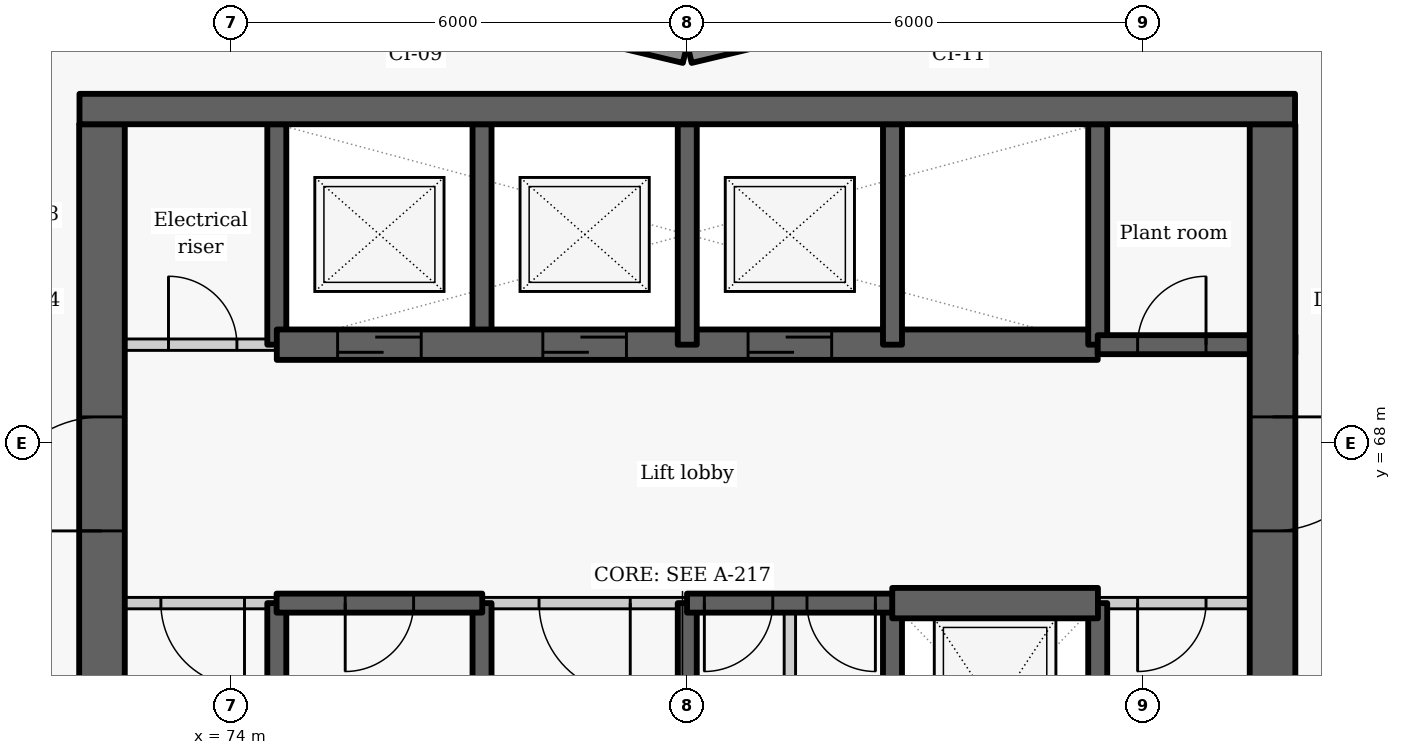
"""IFC4 building model, lengths in metres.
Left out: names, types, materials, properties, quantities, classifications, styles, units other than length and angle.
Written with IfcOpenShell. Run it as: python <this file> out.ifc"""

import sys

from ifc_helpers import new_model, si_unit, direction, frame, frame_2d, origin, place, context, subcontext, project, spatial, rectangle, extrude, element, fill, save


model = new_model("IFC4")
c1 = context("Model", 3, precision=1e-05, world=origin(), true_north=direction((0.0, 1.0)))
c2 = subcontext(c1, "Body", "Model", "MODEL_VIEW")
j1 = project(units=[si_unit("LENGTHUNIT", "METRE"), si_unit("PLANEANGLEUNIT", "RADIAN")], contexts=[c1])
p1 = place(None, origin())
s1 = spatial("IfcSite", under=j1, at=p1, CompositionType="ELEMENT")
p2 = place(p1, origin())
s2 = spatial("IfcBuilding", under=s1, at=p2, CompositionType="ELEMENT")
p3 = place(p2, frame((0.0, 0.0, 81.0)))
s3 = spatial("IfcBuildingStorey", under=s2, at=p3, CompositionType="ELEMENT", Elevation=81.0)
for number, where, z_axis, x_axis in (
    (1, (83.186, 73.881, 0.0), (0.0, 0.0, 1.0), (-0.973, -0.232, 0.0)),
    (2, (79.971, 73.128, 0.0), (0.0, 0.0, 1.0), (-0.973, 0.232, 0.0)),
):
    element("IfcWall", number, at=place(p3, frame(where, z_axis=z_axis, x_axis=x_axis)), inside=s3, PredefinedType="SOLIDWALL", context=c2, shape_type="SweptSolid", body=[
        extrude(rectangle(XDim=3.246, YDim=0.25, at=frame_2d((1.623, 0.0))), origin(), (0.0, 0.0, 1.0), 2.425),
    ])
p4 = place(p3, frame((74.6, 63.1, -0.275), z_axis=(0.0, 0.0, 1.0), x_axis=(0.0, 1.0, 0.0)))
e3 = element("IfcWall", 3, at=p4, inside=s3, PredefinedType="SHEAR", context=c2, shape_type="SweptSolid", body=[
    extrude(rectangle(XDim=2.8, YDim=0.25, at=frame_2d((1.4, 0.0))), origin(), (0.0, 0.0, 1.0), 3.3),
])
p5 = place(p3, frame((74.6, 69.3, -0.275), z_axis=(0.0, 0.0, 1.0), x_axis=(0.0, 1.0, 0.0)))
e4 = element("IfcWall", 4, at=p5, inside=s3, PredefinedType="SHEAR", context=c2, shape_type="SweptSolid", body=[
    extrude(rectangle(XDim=2.9, YDim=0.25, at=frame_2d((1.45, 0.0))), origin(), (0.0, 0.0, 1.0), 3.3),
])
p6 = place(p3, frame((72.0, 69.3, 0.0), z_axis=(0.0, 0.0, 1.0), x_axis=(1.0, 0.0, 0.0)))
e5 = element("IfcWall", 5, at=p6, inside=s3, PredefinedType="PARTITIONING", context=c2, shape_type="SweptSolid", body=[
    extrude(rectangle(XDim=2.6, YDim=0.15, at=frame_2d((1.3, 0.0))), origin(), (0.0, 0.0, 1.0), 3.025),
])
p7 = place(p6, frame((1.175, 0.0, 0.0)))
e6 = element("IfcOpeningElement", 6, at=p7, cuts=e5, PredefinedType="OPENING", context=c2, shape_type="SweptSolid", body=[
    extrude(rectangle(XDim=0.9, YDim=2.1, at=frame_2d((0.45, 1.05))), frame((0.0, 0.085, 0.0), z_axis=(0.0, -1.0, 0.0), x_axis=(1.0, 0.0, 0.0)), (0.0, 0.0, 1.0), 0.17),
])
p8 = place(p3, frame((72.3, 63.1, -0.275), z_axis=(0.0, 0.0, 1.0), x_axis=(0.0, 1.0, 0.0)))
e7 = element("IfcWall", 7, at=p8, inside=s3, PredefinedType="SHEAR", context=c2, shape_type="SweptSolid", body=[
    extrude(rectangle(XDim=9.1, YDim=0.6, at=frame_2d((4.55, 0.0))), origin(), (0.0, 0.0, 1.0), 3.3),
])
p9 = place(p8, frame((3.75, 0.0, 0.275)))
e8 = element("IfcOpeningElement", 8, at=p9, cuts=e7, PredefinedType="OPENING", context=c2, shape_type="SweptSolid", body=[
    extrude(rectangle(XDim=1.5, YDim=2.1, at=frame_2d((0.75, 1.05))), frame((0.0, 0.31, 0.0), z_axis=(0.0, -1.0, 0.0), x_axis=(1.0, 0.0, 0.0)), (0.0, 0.0, 1.0), 0.62),
])
p10 = place(p3, frame((77.3, 63.1, -0.275), z_axis=(0.0, 0.0, 1.0), x_axis=(0.0, 1.0, 0.0)))
e9 = element("IfcWall", 9, at=p10, inside=s3, PredefinedType="SHEAR", context=c2, shape_type="SweptSolid", body=[
    extrude(rectangle(XDim=2.8, YDim=0.25, at=frame_2d((1.4, 0.0))), origin(), (0.0, 0.0, 1.0), 3.3),
])
p11 = place(p3, frame((77.3, 69.3, -0.275), z_axis=(0.0, 0.0, 1.0), x_axis=(0.0, 1.0, 0.0)))
e10 = element("IfcWall", 10, at=p11, inside=s3, PredefinedType="SHEAR", context=c2, shape_type="SweptSolid", body=[
    extrude(rectangle(XDim=2.9, YDim=0.25, at=frame_2d((1.45, 0.0))), origin(), (0.0, 0.0, 1.0), 3.3),
])
p12 = place(p3, frame((74.6, 69.3, -0.275), z_axis=(0.0, 0.0, 1.0), x_axis=(1.0, 0.0, 0.0)))
e11 = element("IfcWall", 11, at=p12, inside=s3, PredefinedType="SHEAR", context=c2, shape_type="SweptSolid", body=[
    extrude(rectangle(XDim=10.8, YDim=0.4, at=frame_2d((5.4, 0.0))), origin(), (0.0, 0.0, 1.0), 3.3),
])
p13 = place(p12, frame((0.8, 0.0, 0.275)))
e12 = element("IfcOpeningElement", 12, at=p13, cuts=e11, PredefinedType="OPENING", context=c2, shape_type="SweptSolid", body=[
    extrude(rectangle(XDim=1.1, YDim=2.1, at=frame_2d((0.55, 1.05))), frame((0.0, 0.21, 0.0), z_axis=(0.0, -1.0, 0.0), x_axis=(1.0, 0.0, 0.0)), (0.0, 0.0, 1.0), 0.42),
])
p14 = place(p12, frame((3.5, 0.0, 0.275)))
e13 = element("IfcOpeningElement", 13, at=p14, cuts=e11, PredefinedType="OPENING", context=c2, shape_type="SweptSolid", body=[
    extrude(rectangle(XDim=1.1, YDim=2.1, at=frame_2d((0.55, 1.05))), frame((0.0, 0.21, 0.0), z_axis=(0.0, -1.0, 0.0), x_axis=(1.0, 0.0, 0.0)), (0.0, 0.0, 1.0), 0.42),
])
p15 = place(p12, frame((6.2, 0.0, 0.275)))
e14 = element("IfcOpeningElement", 14, at=p15, cuts=e11, PredefinedType="OPENING", context=c2, shape_type="SweptSolid", body=[
    extrude(rectangle(XDim=1.1, YDim=2.1, at=frame_2d((0.55, 1.05))), frame((0.0, 0.21, 0.0), z_axis=(0.0, -1.0, 0.0), x_axis=(1.0, 0.0, 0.0)), (0.0, 0.0, 1.0), 0.42),
])
p16 = place(p3, frame((80.0, 63.1, -0.275), z_axis=(0.0, 0.0, 1.0), x_axis=(0.0, 1.0, 0.0)))
e15 = element("IfcWall", 15, at=p16, inside=s3, PredefinedType="SHEAR", context=c2, shape_type="SweptSolid", body=[
    extrude(rectangle(XDim=2.8, YDim=0.25, at=frame_2d((1.4, 0.0))), origin(), (0.0, 0.0, 1.0), 3.3),
])
p17 = place(p3, frame((80.0, 69.3, -0.275), z_axis=(0.0, 0.0, 1.0), x_axis=(0.0, 1.0, 0.0)))
e16 = element("IfcWall", 16, at=p17, inside=s3, PredefinedType="SHEAR", context=c2, shape_type="SweptSolid", body=[
    extrude(rectangle(XDim=2.9, YDim=0.25, at=frame_2d((1.45, 0.0))), origin(), (0.0, 0.0, 1.0), 3.3),
])
p18 = place(p3, frame((82.7, 63.1, -0.275), z_axis=(0.0, 0.0, 1.0), x_axis=(0.0, 1.0, 0.0)))
e17 = element("IfcWall", 17, at=p18, inside=s3, PredefinedType="SHEAR", context=c2, shape_type="SweptSolid", body=[
    extrude(rectangle(XDim=2.8, YDim=0.25, at=frame_2d((1.4, 0.0))), origin(), (0.0, 0.0, 1.0), 3.3),
])
p19 = place(p3, frame((82.7, 69.3, -0.275), z_axis=(0.0, 0.0, 1.0), x_axis=(0.0, 1.0, 0.0)))
e18 = element("IfcWall", 18, at=p19, inside=s3, PredefinedType="SHEAR", context=c2, shape_type="SweptSolid", body=[
    extrude(rectangle(XDim=2.9, YDim=0.25, at=frame_2d((1.45, 0.0))), origin(), (0.0, 0.0, 1.0), 3.3),
])
p20 = place(p3, frame((85.4, 63.1, -0.275), z_axis=(0.0, 0.0, 1.0), x_axis=(0.0, 1.0, 0.0)))
e19 = element("IfcWall", 19, at=p20, inside=s3, PredefinedType="SHEAR", context=c2, shape_type="SweptSolid", body=[
    extrude(rectangle(XDim=2.8, YDim=0.25, at=frame_2d((1.4, 0.0))), origin(), (0.0, 0.0, 1.0), 3.3),
])
p21 = place(p3, frame((85.4, 69.3, -0.275), z_axis=(0.0, 0.0, 1.0), x_axis=(0.0, 1.0, 0.0)))
e20 = element("IfcWall", 20, at=p21, inside=s3, PredefinedType="SHEAR", context=c2, shape_type="SweptSolid", body=[
    extrude(rectangle(XDim=2.9, YDim=0.25, at=frame_2d((1.45, 0.0))), origin(), (0.0, 0.0, 1.0), 3.3),
])
p22 = place(p3, frame((85.4, 69.3, -0.275), z_axis=(0.0, 0.0, 1.0), x_axis=(1.0, 0.0, 0.0)))
e21 = element("IfcWall", 21, at=p22, inside=s3, PredefinedType="SHEAR", context=c2, shape_type="SweptSolid", body=[
    extrude(rectangle(XDim=2.6, YDim=0.25, at=frame_2d((1.3, 0.0))), origin(), (0.0, 0.0, 1.0), 3.3),
])
p23 = place(p22, frame((0.525, 0.0, 0.275)))
e22 = element("IfcOpeningElement", 22, at=p23, cuts=e21, PredefinedType="OPENING", context=c2, shape_type="SweptSolid", body=[
    extrude(rectangle(XDim=0.9, YDim=2.1, at=frame_2d((0.45, 1.05))), frame((0.0, 0.135, 0.0), z_axis=(0.0, -1.0, 0.0), x_axis=(1.0, 0.0, 0.0)), (0.0, 0.0, 1.0), 0.27),
])
p24 = place(p3, frame((87.7, 72.2, -0.275), z_axis=(0.0, 0.0, 1.0), x_axis=(0.0, -1.0, 0.0)))
e23 = element("IfcWall", 23, at=p24, inside=s3, PredefinedType="SHEAR", context=c2, shape_type="SweptSolid", body=[
    extrude(rectangle(XDim=15.6, YDim=0.6, at=frame_2d((7.8, 0.0))), origin(), (0.0, 0.0, 1.0), 3.3),
])
p25 = place(p24, frame((3.85, 0.0, 0.275)))
e24 = element("IfcOpeningElement", 24, at=p25, cuts=e23, PredefinedType="OPENING", context=c2, shape_type="SweptSolid", body=[
    extrude(rectangle(XDim=1.5, YDim=2.1, at=frame_2d((0.75, 1.05))), frame((0.0, 0.31, 0.0), z_axis=(0.0, -1.0, 0.0), x_axis=(1.0, 0.0, 0.0)), (0.0, 0.0, 1.0), 0.62),
])
p26 = place(p24, frame((11.8, 0.0, 0.275)))
e25 = element("IfcOpeningElement", 25, at=p26, cuts=e23, PredefinedType="OPENING", context=c2, shape_type="SweptSolid", body=[
    extrude(rectangle(XDim=1.1, YDim=2.1, at=frame_2d((0.55, 1.05))), frame((0.0, 0.31, 0.0), z_axis=(0.0, -1.0, 0.0), x_axis=(1.0, 0.0, 0.0)), (0.0, 0.0, 1.0), 0.62),
])
p27 = place(p3, frame((74.603, 65.9, 0.0), z_axis=(0.0, 0.0, 1.0), x_axis=(-1.0, 0.0, 0.0)))
e26 = element("IfcWall", 26, at=p27, inside=s3, PredefinedType="PARTITIONING", context=c2, shape_type="SweptSolid", body=[
    extrude(rectangle(XDim=2.603, YDim=0.15, at=frame_2d((1.302, 0.0))), origin(), (0.0, 0.0, 1.0), 3.025),
])
p28 = place(p27, frame((0.428, 0.0, 0.0)))
e27 = element("IfcOpeningElement", 27, at=p28, cuts=e26, PredefinedType="OPENING", context=c2, shape_type="SweptSolid", body=[
    extrude(rectangle(XDim=1.1, YDim=2.1, at=frame_2d((0.55, 1.05))), frame((0.0, 0.085, 0.0), z_axis=(0.0, -1.0, 0.0), x_axis=(1.0, 0.0, 0.0)), (0.0, 0.0, 1.0), 0.17),
])
p29 = place(p3, frame((80.003, 65.9, 0.0), z_axis=(0.0, 0.0, 1.0), x_axis=(-1.0, 0.0, 0.0)))
e28 = element("IfcWall", 28, at=p29, inside=s3, PredefinedType="PARTITIONING", context=c2, shape_type="SweptSolid", body=[
    extrude(rectangle(XDim=2.706, YDim=0.15, at=frame_2d((1.353, 0.0))), origin(), (0.0, 0.0, 1.0), 3.025),
])
p30 = place(p29, frame((0.753, 0.0, 0.0)))
e29 = element("IfcOpeningElement", 29, at=p30, cuts=e28, PredefinedType="OPENING", context=c2, shape_type="SweptSolid", body=[
    extrude(rectangle(XDim=1.2, YDim=2.1, at=frame_2d((0.6, 1.05))), frame((0.0, 0.085, 0.0), z_axis=(0.0, -1.0, 0.0), x_axis=(1.0, 0.0, 0.0)), (0.0, 0.0, 1.0), 0.17),
])
p31 = place(p3, frame((88.0, 65.9, 0.0), z_axis=(0.0, 0.0, 1.0), x_axis=(-1.0, 0.0, 0.0)))
e30 = element("IfcWall", 30, at=p31, inside=s3, PredefinedType="PARTITIONING", context=c2, shape_type="SweptSolid", body=[
    extrude(rectangle(XDim=2.603, YDim=0.15, at=frame_2d((1.302, 0.0))), origin(), (0.0, 0.0, 1.0), 3.025),
])
p32 = place(p31, frame((1.175, 0.0, 0.0)))
e31 = element("IfcOpeningElement", 31, at=p32, cuts=e30, PredefinedType="OPENING", context=c2, shape_type="SweptSolid", body=[
    extrude(rectangle(XDim=0.9, YDim=2.1, at=frame_2d((0.45, 1.05))), frame((0.0, 0.085, 0.0), z_axis=(0.0, -1.0, 0.0), x_axis=(1.0, 0.0, 0.0)), (0.0, 0.0, 1.0), 0.17),
])
p33 = place(p3, frame((77.303, 65.9, -0.275), z_axis=(0.0, 0.0, 1.0), x_axis=(-1.0, 0.0, 0.0)))
e32 = element("IfcWall", 32, at=p33, inside=s3, PredefinedType="SHEAR", context=c2, shape_type="SweptSolid", body=[
    extrude(rectangle(XDim=2.706, YDim=0.25, at=frame_2d((1.353, 0.0))), origin(), (0.0, 0.0, 1.0), 3.3),
])
p34 = place(p33, frame((0.903, 0.0, 0.275)))
e33 = element("IfcOpeningElement", 33, at=p34, cuts=e32, PredefinedType="OPENING", context=c2, shape_type="SweptSolid", body=[
    extrude(rectangle(XDim=0.9, YDim=2.1, at=frame_2d((0.45, 1.05))), frame((0.0, 0.135, 0.0), z_axis=(0.0, -1.0, 0.0), x_axis=(1.0, 0.0, 0.0)), (0.0, 0.0, 1.0), 0.27),
])
p35 = place(p3, frame((82.703, 65.9, -0.275), z_axis=(0.0, 0.0, 1.0), x_axis=(-1.0, 0.0, 0.0)))
e34 = element("IfcWall", 34, at=p35, inside=s3, PredefinedType="SHEAR", context=c2, shape_type="SweptSolid", body=[
    extrude(rectangle(XDim=2.706, YDim=0.25, at=frame_2d((1.353, 0.0))), origin(), (0.0, 0.0, 1.0), 3.3),
])
p36 = place(p35, frame((1.578, 0.0, 0.275)))
e35 = element("IfcOpeningElement", 35, at=p36, cuts=e34, PredefinedType="OPENING", context=c2, shape_type="SweptSolid", body=[
    extrude(rectangle(XDim=0.9, YDim=2.1, at=frame_2d((0.45, 1.05))), frame((0.0, 0.135, 0.0), z_axis=(0.0, -1.0, 0.0), x_axis=(1.0, 0.0, 0.0)), (0.0, 0.0, 1.0), 0.27),
])
p37 = place(p35, frame((0.228, 0.0, 0.275)))
e36 = element("IfcOpeningElement", 36, at=p37, cuts=e34, PredefinedType="OPENING", context=c2, shape_type="SweptSolid", body=[
    extrude(rectangle(XDim=0.9, YDim=2.1, at=frame_2d((0.45, 1.05))), frame((0.0, 0.135, 0.0), z_axis=(0.0, -1.0, 0.0), x_axis=(1.0, 0.0, 0.0)), (0.0, 0.0, 1.0), 0.27),
])
p38 = place(p3, frame((82.697, 65.9, -0.275), z_axis=(0.0, 0.0, 1.0), x_axis=(1.0, 0.0, 0.0)))
e37 = element("IfcWall", 37, at=p38, inside=s3, PredefinedType="SHEAR", context=c2, shape_type="SweptSolid", body=[
    extrude(rectangle(XDim=2.706, YDim=0.4, at=frame_2d((1.353, 0.0))), origin(), (0.0, 0.0, 1.0), 3.3),
])
p39 = place(p3, frame((81.35, 63.1, 0.0), z_axis=(0.0, 0.0, 1.0), x_axis=(0.0, 1.0, 0.0)))
e38 = element("IfcWall", 38, at=p39, inside=s3, PredefinedType="PARTITIONING", context=c2, shape_type="SweptSolid", body=[
    extrude(rectangle(XDim=2.8, YDim=0.15, at=frame_2d((1.4, 0.0))), origin(), (0.0, 0.0, 1.0), 3.025),
])
p40 = place(p3, frame((72.004, 72.4, -0.275), z_axis=(0.0, 0.0, 1.0), x_axis=(1.0, 0.0, 0.0)))
e39 = element("IfcWall", 39, at=p40, inside=s3, PredefinedType="SHEAR", context=c2, shape_type="SweptSolid", body=[
    extrude(rectangle(XDim=15.992, YDim=0.4, at=frame_2d((7.996, 0.0))), origin(), (0.0, 0.0, 1.0), 3.3),
])
p41 = place(p7, origin())
e40 = element("IfcDoor", 40, at=p41, inside=s3, OperationType="SINGLE_SWING_LEFT", PredefinedType="DOOR", context=c2, shape_type="SweptSolid", body=[
    extrude(rectangle(XDim=0.9, YDim=2.1, at=frame_2d((0.45, 1.05))), frame((0.0, 0.025, 0.0), z_axis=(0.0, -1.0, 0.0), x_axis=(1.0, 0.0, 0.0)), (0.0, 0.0, 1.0), 0.05),
])
fill(e6, e40)
p42 = place(p13, origin())
e41 = element("IfcDoor", 41, at=p42, inside=s3, OperationType="SLIDING_TO_LEFT", PredefinedType="DOOR", context=c2, shape_type="SweptSolid", body=[
    extrude(rectangle(XDim=1.1, YDim=2.1, at=frame_2d((0.55, 1.05))), frame((0.0, 0.025, 0.0), z_axis=(0.0, -1.0, 0.0), x_axis=(1.0, 0.0, 0.0)), (0.0, 0.0, 1.0), 0.05),
])
fill(e12, e41)
p43 = place(p14, origin())
e42 = element("IfcDoor", 42, at=p43, inside=s3, OperationType="SLIDING_TO_LEFT", PredefinedType="DOOR", context=c2, shape_type="SweptSolid", body=[
    extrude(rectangle(XDim=1.1, YDim=2.1, at=frame_2d((0.55, 1.05))), frame((0.0, 0.025, 0.0), z_axis=(0.0, -1.0, 0.0), x_axis=(1.0, 0.0, 0.0)), (0.0, 0.0, 1.0), 0.05),
])
fill(e13, e42)
p44 = place(p15, origin())
e43 = element("IfcDoor", 43, at=p44, inside=s3, OperationType="SLIDING_TO_LEFT", PredefinedType="DOOR", context=c2, shape_type="SweptSolid", body=[
    extrude(rectangle(XDim=1.1, YDim=2.1, at=frame_2d((0.55, 1.05))), frame((0.0, 0.025, 0.0), z_axis=(0.0, -1.0, 0.0), x_axis=(1.0, 0.0, 0.0)), (0.0, 0.0, 1.0), 0.05),
])
fill(e14, e43)
p45 = place(p23, origin())
e44 = element("IfcDoor", 44, at=p45, inside=s3, OperationType="SINGLE_SWING_RIGHT", PredefinedType="DOOR", context=c2, shape_type="SweptSolid", body=[
    extrude(rectangle(XDim=0.9, YDim=2.1, at=frame_2d((0.45, 1.05))), frame((0.0, 0.025, 0.0), z_axis=(0.0, -1.0, 0.0), x_axis=(1.0, 0.0, 0.0)), (0.0, 0.0, 1.0), 0.05),
])
fill(e22, e44)
p46 = place(p28, origin())
e45 = element("IfcDoor", 45, at=p46, inside=s3, OperationType="SINGLE_SWING_LEFT", PredefinedType="DOOR", context=c2, shape_type="SweptSolid", body=[
    extrude(rectangle(XDim=1.1, YDim=2.1, at=frame_2d((0.55, 1.05))), frame((0.0, 0.025, 0.0), z_axis=(0.0, -1.0, 0.0), x_axis=(1.0, 0.0, 0.0)), (0.0, 0.0, 1.0), 0.05),
])
fill(e27, e45)
p47 = place(p34, origin())
e46 = element("IfcDoor", 46, at=p47, inside=s3, OperationType="SINGLE_SWING_RIGHT", PredefinedType="DOOR", context=c2, shape_type="SweptSolid", body=[
    extrude(rectangle(XDim=0.9, YDim=2.1, at=frame_2d((0.45, 1.05))), frame((0.0, 0.025, 0.0), z_axis=(0.0, -1.0, 0.0), x_axis=(1.0, 0.0, 0.0)), (0.0, 0.0, 1.0), 0.05),
])
fill(e33, e46)
p48 = place(p30, origin())
e47 = element("IfcDoor", 47, at=p48, inside=s3, OperationType="DOUBLE_DOOR_SINGLE_SWING", PredefinedType="DOOR", context=c2, shape_type="SweptSolid", body=[
    extrude(rectangle(XDim=1.2, YDim=2.1, at=frame_2d((0.6, 1.05))), frame((0.0, 0.025, 0.0), z_axis=(0.0, -1.0, 0.0), x_axis=(1.0, 0.0, 0.0)), (0.0, 0.0, 1.0), 0.05),
])
fill(e29, e47)
p49 = place(p36, origin())
e48 = element("IfcDoor", 48, at=p49, inside=s3, OperationType="SINGLE_SWING_RIGHT", PredefinedType="DOOR", context=c2, shape_type="SweptSolid", body=[
    extrude(rectangle(XDim=0.9, YDim=2.1, at=frame_2d((0.45, 1.05))), frame((0.0, 0.025, 0.0), z_axis=(0.0, -1.0, 0.0), x_axis=(1.0, 0.0, 0.0)), (0.0, 0.0, 1.0), 0.05),
])
fill(e35, e48)
p50 = place(p37, origin())
e49 = element("IfcDoor", 49, at=p50, inside=s3, OperationType="SINGLE_SWING_LEFT", PredefinedType="DOOR", context=c2, shape_type="SweptSolid", body=[
    extrude(rectangle(XDim=0.9, YDim=2.1, at=frame_2d((0.45, 1.05))), frame((0.0, 0.025, 0.0), z_axis=(0.0, -1.0, 0.0), x_axis=(1.0, 0.0, 0.0)), (0.0, 0.0, 1.0), 0.05),
])
fill(e36, e49)
p51 = place(p32, origin())
e50 = element("IfcDoor", 50, at=p51, inside=s3, OperationType="SINGLE_SWING_RIGHT", PredefinedType="DOOR", context=c2, shape_type="SweptSolid", body=[
    extrude(rectangle(XDim=0.9, YDim=2.1, at=frame_2d((0.45, 1.05))), frame((0.0, 0.025, 0.0), z_axis=(0.0, -1.0, 0.0), x_axis=(1.0, 0.0, 0.0)), (0.0, 0.0, 1.0), 0.05),
])
fill(e31, e50)
p52 = place(p25, origin())
e51 = element("IfcDoor", 51, at=p52, inside=s3, OperationType="DOUBLE_DOOR_SINGLE_SWING", PredefinedType="DOOR", context=c2, shape_type="SweptSolid", body=[
    extrude(rectangle(XDim=1.5, YDim=2.1, at=frame_2d((0.75, 1.05))), frame((0.0, 0.025, 0.0), z_axis=(0.0, -1.0, 0.0), x_axis=(1.0, 0.0, 0.0)), (0.0, 0.0, 1.0), 0.05),
])
fill(e24, e51)
p53 = place(p9, origin())
e52 = element("IfcDoor", 52, at=p53, inside=s3, OperationType="DOUBLE_DOOR_SINGLE_SWING", PredefinedType="DOOR", context=c2, shape_type="SweptSolid", body=[
    extrude(rectangle(XDim=1.5, YDim=2.1, at=frame_2d((0.75, 1.05))), frame((0.0, 0.025, 0.0), z_axis=(0.0, -1.0, 0.0), x_axis=(1.0, 0.0, 0.0)), (0.0, 0.0, 1.0), 0.05),
])
fill(e8, e52)
save(model, sys.argv[1])
